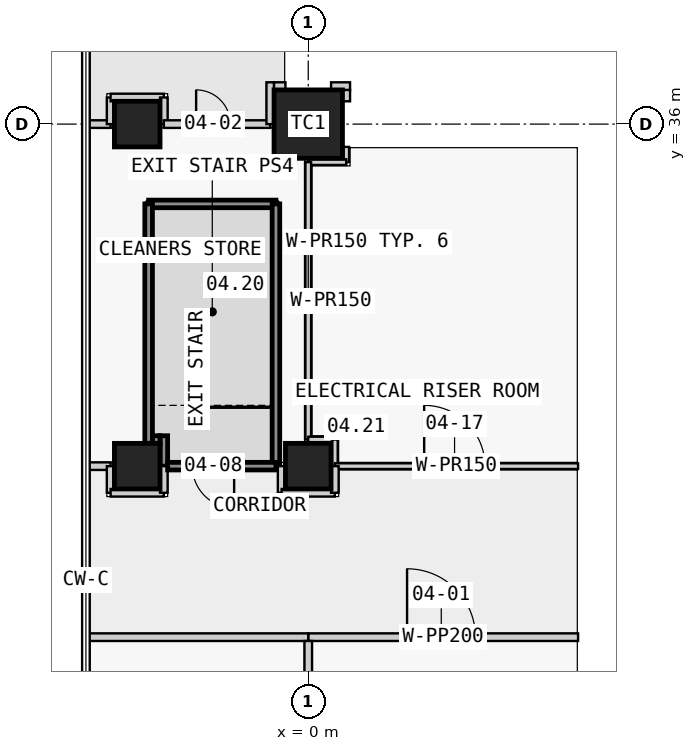
"""IFC4 building model, lengths in metres.
Left out: names, types, materials, properties, quantities, classifications, styles, units other than length and angle.
Written with IfcOpenShell. Run it as: python <this file> out.ifc"""

import sys

from ifc_helpers import new_model, si_unit, direction, frame, frame_2d, origin, origin_2d, place, context, subcontext, project, spatial, rectangle, extrude, element, fill, save


model = new_model("IFC4")
c1 = context("Model", 3, precision=1e-05, world=origin(), true_north=direction((0.0, 1.0)))
c2 = subcontext(c1, "Body", "Model", "MODEL_VIEW")
j1 = project(units=[si_unit("LENGTHUNIT", "METRE"), si_unit("PLANEANGLEUNIT", "RADIAN")], contexts=[c1])
p1 = place(None, origin())
s1 = spatial("IfcSite", under=j1, at=p1, CompositionType="ELEMENT")
p2 = place(p1, origin())
s2 = spatial("IfcBuilding", under=s1, at=p2, CompositionType="ELEMENT")
p3 = place(p2, frame((0.0, 0.0, 21.8)))
s3 = spatial("IfcBuildingStorey", under=s2, at=p3, CompositionType="ELEMENT", Elevation=21.8)
for number, where, z_axis, x_axis in (
    (1, (-4.5, 27.0, 0.0), (0.0, 0.0, 1.0), (1.0, 0.0, 0.0)),
    (2, (-4.5, 36.0, 0.0), (0.0, 0.0, 1.0), (1.0, 0.0, 0.0)),
    (3, (0.0, 27.0, 0.0), (0.0, 0.0, 1.0), (1.0, 0.0, 0.0)),
):
    element("IfcColumn", number, at=place(p3, frame(where, z_axis=z_axis, x_axis=x_axis)), inside=s3, PredefinedType="COLUMN", context=c2, shape_type="SweptSolid", body=[
        extrude(rectangle(XDim=1.2, YDim=1.2, at=origin_2d()), origin(), (0.0, 0.0, 1.0), 5.0),
    ])
p4 = place(p3, frame((0.0, 36.0, 0.0), z_axis=(0.0, 0.0, 1.0), x_axis=(1.0, 0.0, 0.0)))
e4 = element("IfcColumn", 4, at=p4, inside=s3, PredefinedType="COLUMN", context=c2, shape_type="SweptSolid", body=[
    extrude(rectangle(XDim=1.8, YDim=1.8, at=origin_2d()), origin(), (0.0, 0.0, 1.0), 5.0),
])
p5 = place(p3, frame((0.0, 22.5, 0.0), z_axis=(0.0, 0.0, 1.0), x_axis=(1.0, 0.0, 0.0)))
e5 = element("IfcWall", 5, at=p5, inside=s3, PredefinedType="PARTITIONING", context=c2, shape_type="SweptSolid", body=[
    extrude(rectangle(XDim=7.1, YDim=0.2, at=frame_2d((3.55, 0.0))), origin(), (0.0, 0.0, 1.0), 4.5),
])
p6 = place(p5, frame((2.6, 0.0, 0.0)))
e6 = element("IfcOpeningElement", 6, at=p6, cuts=e5, PredefinedType="OPENING", context=c2, shape_type="SweptSolid", body=[
    extrude(rectangle(XDim=1.8, YDim=2.1, at=frame_2d((0.9, 1.05))), frame((0.0, 0.11, 0.0), z_axis=(0.0, -1.0, 0.0), x_axis=(1.0, 0.0, 0.0)), (0.0, 0.0, 1.0), 0.22),
])
p7 = place(p3, frame((1.0, 35.4, 0.0), z_axis=(0.0, 0.0, 1.0), x_axis=(0.0, -1.0, 0.0)))
e7 = element("IfcWall", 7, at=p7, inside=s3, PredefinedType="PARTITIONING", context=c2, shape_type="SweptSolid", body=[
    extrude(rectangle(XDim=0.4, YDim=0.15, at=frame_2d((0.2, 0.0))), origin(), (0.0, 0.0, 1.0), 4.5),
])
p8 = place(p3, frame((1.0, 35.0, 0.0), z_axis=(0.0, 0.0, 1.0), x_axis=(-1.0, 0.0, 0.0)))
e8 = element("IfcWall", 8, at=p8, inside=s3, PredefinedType="PARTITIONING", context=c2, shape_type="SweptSolid", body=[
    extrude(rectangle(XDim=1.0, YDim=0.15, at=frame_2d((0.5, 0.0))), origin(), (0.0, 0.0, 1.0), 4.5),
])
p9 = place(p3, frame((0.0, 35.0, 0.0), z_axis=(0.0, 0.0, 1.0), x_axis=(0.0, -1.0, 0.0)))
e9 = element("IfcWall", 9, at=p9, inside=s3, PredefinedType="PARTITIONING", context=c2, shape_type="SweptSolid", body=[
    extrude(rectangle(XDim=7.3, YDim=0.15, at=frame_2d((3.65, 0.0))), origin(), (0.0, 0.0, 1.0), 4.5),
])
for number, where, z_axis, x_axis in (
    (10, (0.0, 27.7, 0.0), (0.0, 0.0, 1.0), (1.0, 0.0, 0.0)),
    (11, (0.7, 27.7, 0.0), (0.0, 0.0, 1.0), (0.0, -1.0, 0.0)),
):
    element("IfcWall", number, at=place(p3, frame(where, z_axis=z_axis, x_axis=x_axis)), inside=s3, PredefinedType="PARTITIONING", context=c2, shape_type="SweptSolid", body=[
        extrude(rectangle(XDim=0.7, YDim=0.15, at=frame_2d((0.35, 0.0))), origin(), (0.0, 0.0, 1.0), 4.5),
    ])
p10 = place(p3, frame((-4.2, 33.9, 0.0), z_axis=(0.0, 0.0, 1.0), x_axis=(1.0, 0.0, 0.0)))
e12 = element("IfcWall", 12, at=p10, inside=s3, PredefinedType="PARTITIONING", context=c2, shape_type="SweptSolid", body=[
    extrude(rectangle(XDim=3.35, YDim=0.2, at=frame_2d((1.675, 0.0))), origin(), (0.0, 0.0, 1.0), 4.5),
])
p11 = place(p3, frame((-0.85, 33.9, 0.0), z_axis=(0.0, 0.0, 1.0), x_axis=(0.0, -1.0, 0.0)))
e13 = element("IfcWall", 13, at=p11, inside=s3, PredefinedType="PARTITIONING", context=c2, shape_type="SweptSolid", body=[
    extrude(rectangle(XDim=6.9, YDim=0.2, at=frame_2d((3.45, 0.0))), origin(), (0.0, 0.0, 1.0), 4.5),
])
p12 = place(p3, frame((-5.85, 36.0, 0.0), z_axis=(0.0, 0.0, 1.0), x_axis=(1.0, 0.0, 0.0)))
e14 = element("IfcWall", 14, at=p12, inside=s3, PredefinedType="PARTITIONING", context=c2, shape_type="SweptSolid", body=[
    extrude(rectangle(XDim=0.65, YDim=0.2, at=frame_2d((0.325, 0.0))), origin(), (0.0, 0.0, 1.0), 4.5),
])
p13 = place(p3, frame((-5.2, 36.0, 0.0), z_axis=(0.0, 0.0, 1.0), x_axis=(0.0, 1.0, 0.0)))
e15 = element("IfcWall", 15, at=p13, inside=s3, PredefinedType="PARTITIONING", context=c2, shape_type="SweptSolid", body=[
    extrude(rectangle(XDim=0.7, YDim=0.2, at=frame_2d((0.35, 0.0))), origin(), (0.0, 0.0, 1.0), 4.5),
])
p14 = place(p3, frame((-5.2, 36.7, 0.0), z_axis=(0.0, 0.0, 1.0), x_axis=(1.0, 0.0, 0.0)))
e16 = element("IfcWall", 16, at=p14, inside=s3, PredefinedType="PARTITIONING", context=c2, shape_type="SweptSolid", body=[
    extrude(rectangle(XDim=1.4, YDim=0.2, at=frame_2d((0.7, 0.0))), origin(), (0.0, 0.0, 1.0), 4.5),
])
p15 = place(p3, frame((-3.8, 36.7, 0.0), z_axis=(0.0, 0.0, 1.0), x_axis=(0.0, -1.0, 0.0)))
e17 = element("IfcWall", 17, at=p15, inside=s3, PredefinedType="PARTITIONING", context=c2, shape_type="SweptSolid", body=[
    extrude(rectangle(XDim=0.7, YDim=0.2, at=frame_2d((0.35, 0.0))), origin(), (0.0, 0.0, 1.0), 4.5),
])
p16 = place(p3, frame((-3.8, 36.0, 0.0), z_axis=(0.0, 0.0, 1.0), x_axis=(1.0, 0.0, 0.0)))
e18 = element("IfcWall", 18, at=p16, inside=s3, PredefinedType="PARTITIONING", context=c2, shape_type="SweptSolid", body=[
    extrude(rectangle(XDim=2.8, YDim=0.2, at=frame_2d((1.4, 0.0))), origin(), (0.0, 0.0, 1.0), 4.5),
])
p17 = place(p16, frame((0.85, 0.0, 0.0)))
e19 = element("IfcOpeningElement", 19, at=p17, cuts=e18, PredefinedType="OPENING", context=c2, shape_type="SweptSolid", body=[
    extrude(rectangle(XDim=0.9, YDim=2.1, at=frame_2d((0.45, 1.05))), frame((0.0, 0.11, 0.0), z_axis=(0.0, -1.0, 0.0), x_axis=(1.0, 0.0, 0.0)), (0.0, 0.0, 1.0), 0.22),
])
p18 = place(p3, frame((-1.0, 36.0, 0.0), z_axis=(0.0, 0.0, 1.0), x_axis=(0.0, 1.0, 0.0)))
e20 = element("IfcWall", 20, at=p18, inside=s3, PredefinedType="PARTITIONING", context=c2, shape_type="SweptSolid", body=[
    extrude(rectangle(XDim=1.1, YDim=0.2, at=frame_2d((0.55, 0.0))), origin(), (0.0, 0.0, 1.0), 4.5),
])
p19 = place(p3, frame((-0.9, 37.0, 0.0), z_axis=(0.0, 0.0, 1.0), x_axis=(1.0, 0.0, 0.0)))
e21 = element("IfcWall", 21, at=p19, inside=s3, PredefinedType="PARTITIONING", context=c2, shape_type="SweptSolid", body=[
    extrude(rectangle(XDim=0.3, YDim=0.2, at=frame_2d((0.15, 0.0))), origin(), (0.0, 0.0, 1.0), 4.5),
])
p20 = place(p3, frame((0.7, 27.0, 0.0), z_axis=(0.0, 0.0, 1.0), x_axis=(1.0, 0.0, 0.0)))
e22 = element("IfcWall", 22, at=p20, inside=s3, PredefinedType="PARTITIONING", context=c2, shape_type="SweptSolid", body=[
    extrude(rectangle(XDim=6.4, YDim=0.15, at=frame_2d((3.2, 0.0))), origin(), (0.0, 0.0, 1.0), 4.5),
])
p21 = place(p20, frame((2.35, 0.0, 0.0)))
e23 = element("IfcOpeningElement", 23, at=p21, cuts=e22, PredefinedType="OPENING", context=c2, shape_type="SweptSolid", body=[
    extrude(rectangle(XDim=1.6, YDim=2.4, at=frame_2d((0.8, 1.2))), frame((0.0, 0.085, 0.0), z_axis=(0.0, -1.0, 0.0), x_axis=(1.0, 0.0, 0.0)), (0.0, 0.0, 1.0), 0.17),
])
p22 = place(p3, frame((-3.8, 27.0, 0.0), z_axis=(0.0, 0.0, 1.0), x_axis=(0.0, 1.0, 0.0)))
e24 = element("IfcWall", 24, at=p22, inside=s3, PredefinedType="PARTITIONING", context=c2, shape_type="SweptSolid", body=[
    extrude(rectangle(XDim=0.8, YDim=0.2, at=frame_2d((0.4, 0.0))), origin(), (0.0, 0.0, 1.0), 4.5),
])
p23 = place(p3, frame((-3.9, 27.7, 0.0), z_axis=(0.0, 0.0, 1.0), x_axis=(-1.0, 0.0, 0.0)))
e25 = element("IfcWall", 25, at=p23, inside=s3, PredefinedType="PARTITIONING", context=c2, shape_type="SweptSolid", body=[
    extrude(rectangle(XDim=0.2, YDim=0.2, at=frame_2d((0.1, 0.0))), origin(), (0.0, 0.0, 1.0), 4.5),
])
p24 = place(p3, frame((-4.2, 27.6, 0.0), z_axis=(0.0, 0.0, 1.0), x_axis=(0.0, 1.0, 0.0)))
e26 = element("IfcWall", 26, at=p24, inside=s3, PredefinedType="PARTITIONING", context=c2, shape_type="SweptSolid", body=[
    extrude(rectangle(XDim=6.3, YDim=0.2, at=frame_2d((3.15, 0.0))), origin(), (0.0, 0.0, 1.0), 4.5),
])
p25 = place(p3, frame((0.0, 22.5, 0.0), z_axis=(0.0, 0.0, 1.0), x_axis=(-1.0, 0.0, 0.0)))
e27 = element("IfcWall", 27, at=p25, inside=s3, PredefinedType="PARTITIONING", context=c2, shape_type="SweptSolid", body=[
    extrude(rectangle(XDim=5.85, YDim=0.2, at=frame_2d((2.925, 0.0))), origin(), (0.0, 0.0, 1.0), 4.5),
])
p26 = place(p3, frame((0.0, 18.0, 0.0), z_axis=(0.0, 0.0, 1.0), x_axis=(0.0, 1.0, 0.0)))
e28 = element("IfcWall", 28, at=p26, inside=s3, PredefinedType="PARTITIONING", context=c2, shape_type="SweptSolid", body=[
    extrude(rectangle(XDim=4.4, YDim=0.2, at=frame_2d((2.2, 0.0))), origin(), (0.0, 0.0, 1.0), 4.5),
])
p27 = place(p3, frame((-5.85, 27.0, 0.0), z_axis=(0.0, 0.0, 1.0), x_axis=(1.0, 0.0, 0.0)))
e29 = element("IfcWall", 29, at=p27, inside=s3, PredefinedType="PARTITIONING", context=c2, shape_type="SweptSolid", body=[
    extrude(rectangle(XDim=0.65, YDim=0.2, at=frame_2d((0.325, 0.0))), origin(), (0.0, 0.0, 1.0), 4.5),
])
p28 = place(p3, frame((-5.2, 27.0, 0.0), z_axis=(0.0, 0.0, 1.0), x_axis=(0.0, -1.0, 0.0)))
e30 = element("IfcWall", 30, at=p28, inside=s3, PredefinedType="PARTITIONING", context=c2, shape_type="SweptSolid", body=[
    extrude(rectangle(XDim=0.7, YDim=0.2, at=frame_2d((0.35, 0.0))), origin(), (0.0, 0.0, 1.0), 4.5),
])
p29 = place(p3, frame((-5.2, 26.3, 0.0), z_axis=(0.0, 0.0, 1.0), x_axis=(1.0, 0.0, 0.0)))
e31 = element("IfcWall", 31, at=p29, inside=s3, PredefinedType="PARTITIONING", context=c2, shape_type="SweptSolid", body=[
    extrude(rectangle(XDim=1.4, YDim=0.2, at=frame_2d((0.7, 0.0))), origin(), (0.0, 0.0, 1.0), 4.5),
])
p30 = place(p3, frame((-3.8, 26.3, 0.0), z_axis=(0.0, 0.0, 1.0), x_axis=(0.0, 1.0, 0.0)))
e32 = element("IfcWall", 32, at=p30, inside=s3, PredefinedType="PARTITIONING", context=c2, shape_type="SweptSolid", body=[
    extrude(rectangle(XDim=0.7, YDim=0.2, at=frame_2d((0.35, 0.0))), origin(), (0.0, 0.0, 1.0), 4.5),
])
p31 = place(p3, frame((-0.85, 27.0, 0.0), z_axis=(0.0, 0.0, 1.0), x_axis=(-1.0, 0.0, 0.0)))
e33 = element("IfcWall", 33, at=p31, inside=s3, PredefinedType="PARTITIONING", context=c2, shape_type="SweptSolid", body=[
    extrude(rectangle(XDim=2.85, YDim=0.2, at=frame_2d((1.425, 0.0))), origin(), (0.0, 0.0, 1.0), 4.5),
])
p32 = place(p31, frame((1.1, 0.0, 0.0)))
e34 = element("IfcOpeningElement", 34, at=p32, cuts=e33, PredefinedType="OPENING", context=c2, shape_type="SweptSolid", body=[
    extrude(rectangle(XDim=1.1, YDim=2.1, at=frame_2d((0.55, 1.05))), frame((0.0, 0.11, 0.0), z_axis=(0.0, -1.0, 0.0), x_axis=(1.0, 0.0, 0.0)), (0.0, 0.0, 1.0), 0.22),
])
p33 = place(p3, frame((-0.7, 27.0, 0.0), z_axis=(0.0, 0.0, 1.0), x_axis=(0.0, -1.0, 0.0)))
e35 = element("IfcWall", 35, at=p33, inside=s3, PredefinedType="PARTITIONING", context=c2, shape_type="SweptSolid", body=[
    extrude(rectangle(XDim=0.7, YDim=0.2, at=frame_2d((0.35, 0.0))), origin(), (0.0, 0.0, 1.0), 4.5),
])
p34 = place(p3, frame((-0.7, 26.3, 0.0), z_axis=(0.0, 0.0, 1.0), x_axis=(1.0, 0.0, 0.0)))
e36 = element("IfcWall", 36, at=p34, inside=s3, PredefinedType="PARTITIONING", context=c2, shape_type="SweptSolid", body=[
    extrude(rectangle(XDim=1.4, YDim=0.2, at=frame_2d((0.7, 0.0))), origin(), (0.0, 0.0, 1.0), 4.5),
])
p35 = place(p3, frame((0.7, 26.3, 0.0), z_axis=(0.0, 0.0, 1.0), x_axis=(0.0, 1.0, 0.0)))
e37 = element("IfcWall", 37, at=p35, inside=s3, PredefinedType="PARTITIONING", context=c2, shape_type="SweptSolid", body=[
    extrude(rectangle(XDim=0.7, YDim=0.2, at=frame_2d((0.35, 0.0))), origin(), (0.0, 0.0, 1.0), 4.5),
])
p36 = place(p3, frame((1.0, 36.6, 0.0), z_axis=(0.0, 0.0, 1.0), x_axis=(0.0, 1.0, 0.0)))
e38 = element("IfcWall", 38, at=p36, inside=s3, PredefinedType="PARTITIONING", context=c2, shape_type="SweptSolid", body=[
    extrude(rectangle(XDim=0.3, YDim=0.2, at=frame_2d((0.15, 0.0))), origin(), (0.0, 0.0, 1.0), 4.5),
])
p37 = place(p3, frame((1.1, 37.0, 0.0), z_axis=(0.0, 0.0, 1.0), x_axis=(-1.0, 0.0, 0.0)))
e39 = element("IfcWall", 39, at=p37, inside=s3, PredefinedType="PARTITIONING", context=c2, shape_type="SweptSolid", body=[
    extrude(rectangle(XDim=0.5, YDim=0.2, at=frame_2d((0.25, 0.0))), origin(), (0.0, 0.0, 1.0), 4.5),
])
p38 = place(p6, origin())
e40 = element("IfcDoor", 40, at=p38, inside=s3, OperationType="DOUBLE_DOOR_SINGLE_SWING", PredefinedType="DOOR", context=c2, shape_type="SweptSolid", body=[
    extrude(rectangle(XDim=1.8, YDim=2.1, at=frame_2d((0.9, 1.05))), frame((0.0, 0.025, 0.0), z_axis=(0.0, -1.0, 0.0), x_axis=(1.0, 0.0, 0.0)), (0.0, 0.0, 1.0), 0.05),
])
fill(e6, e40)
p39 = place(p17, origin())
e41 = element("IfcDoor", 41, at=p39, inside=s3, OperationType="SINGLE_SWING_LEFT", PredefinedType="DOOR", context=c2, shape_type="SweptSolid", body=[
    extrude(rectangle(XDim=0.9, YDim=2.1, at=frame_2d((0.45, 1.05))), frame((0.0, 0.025, 0.0), z_axis=(0.0, -1.0, 0.0), x_axis=(1.0, 0.0, 0.0)), (0.0, 0.0, 1.0), 0.05),
])
fill(e19, e41)
p40 = place(p32, origin())
e42 = element("IfcDoor", 42, at=p40, inside=s3, OperationType="SINGLE_SWING_LEFT", PredefinedType="DOOR", context=c2, shape_type="SweptSolid", body=[
    extrude(rectangle(XDim=1.1, YDim=2.1, at=frame_2d((0.55, 1.05))), frame((0.0, 0.025, 0.0), z_axis=(0.0, -1.0, 0.0), x_axis=(1.0, 0.0, 0.0)), (0.0, 0.0, 1.0), 0.05),
])
fill(e34, e42)
p41 = place(p21, origin())
e43 = element("IfcDoor", 43, at=p41, inside=s3, OperationType="SINGLE_SWING_LEFT", PredefinedType="DOOR", context=c2, shape_type="SweptSolid", body=[
    extrude(rectangle(XDim=1.6, YDim=2.4, at=frame_2d((0.8, 1.2))), frame((0.0, 0.025, 0.0), z_axis=(0.0, -1.0, 0.0), x_axis=(1.0, 0.0, 0.0)), (0.0, 0.0, 1.0), 0.05),
])
fill(e23, e43)
save(model, sys.argv[1])
